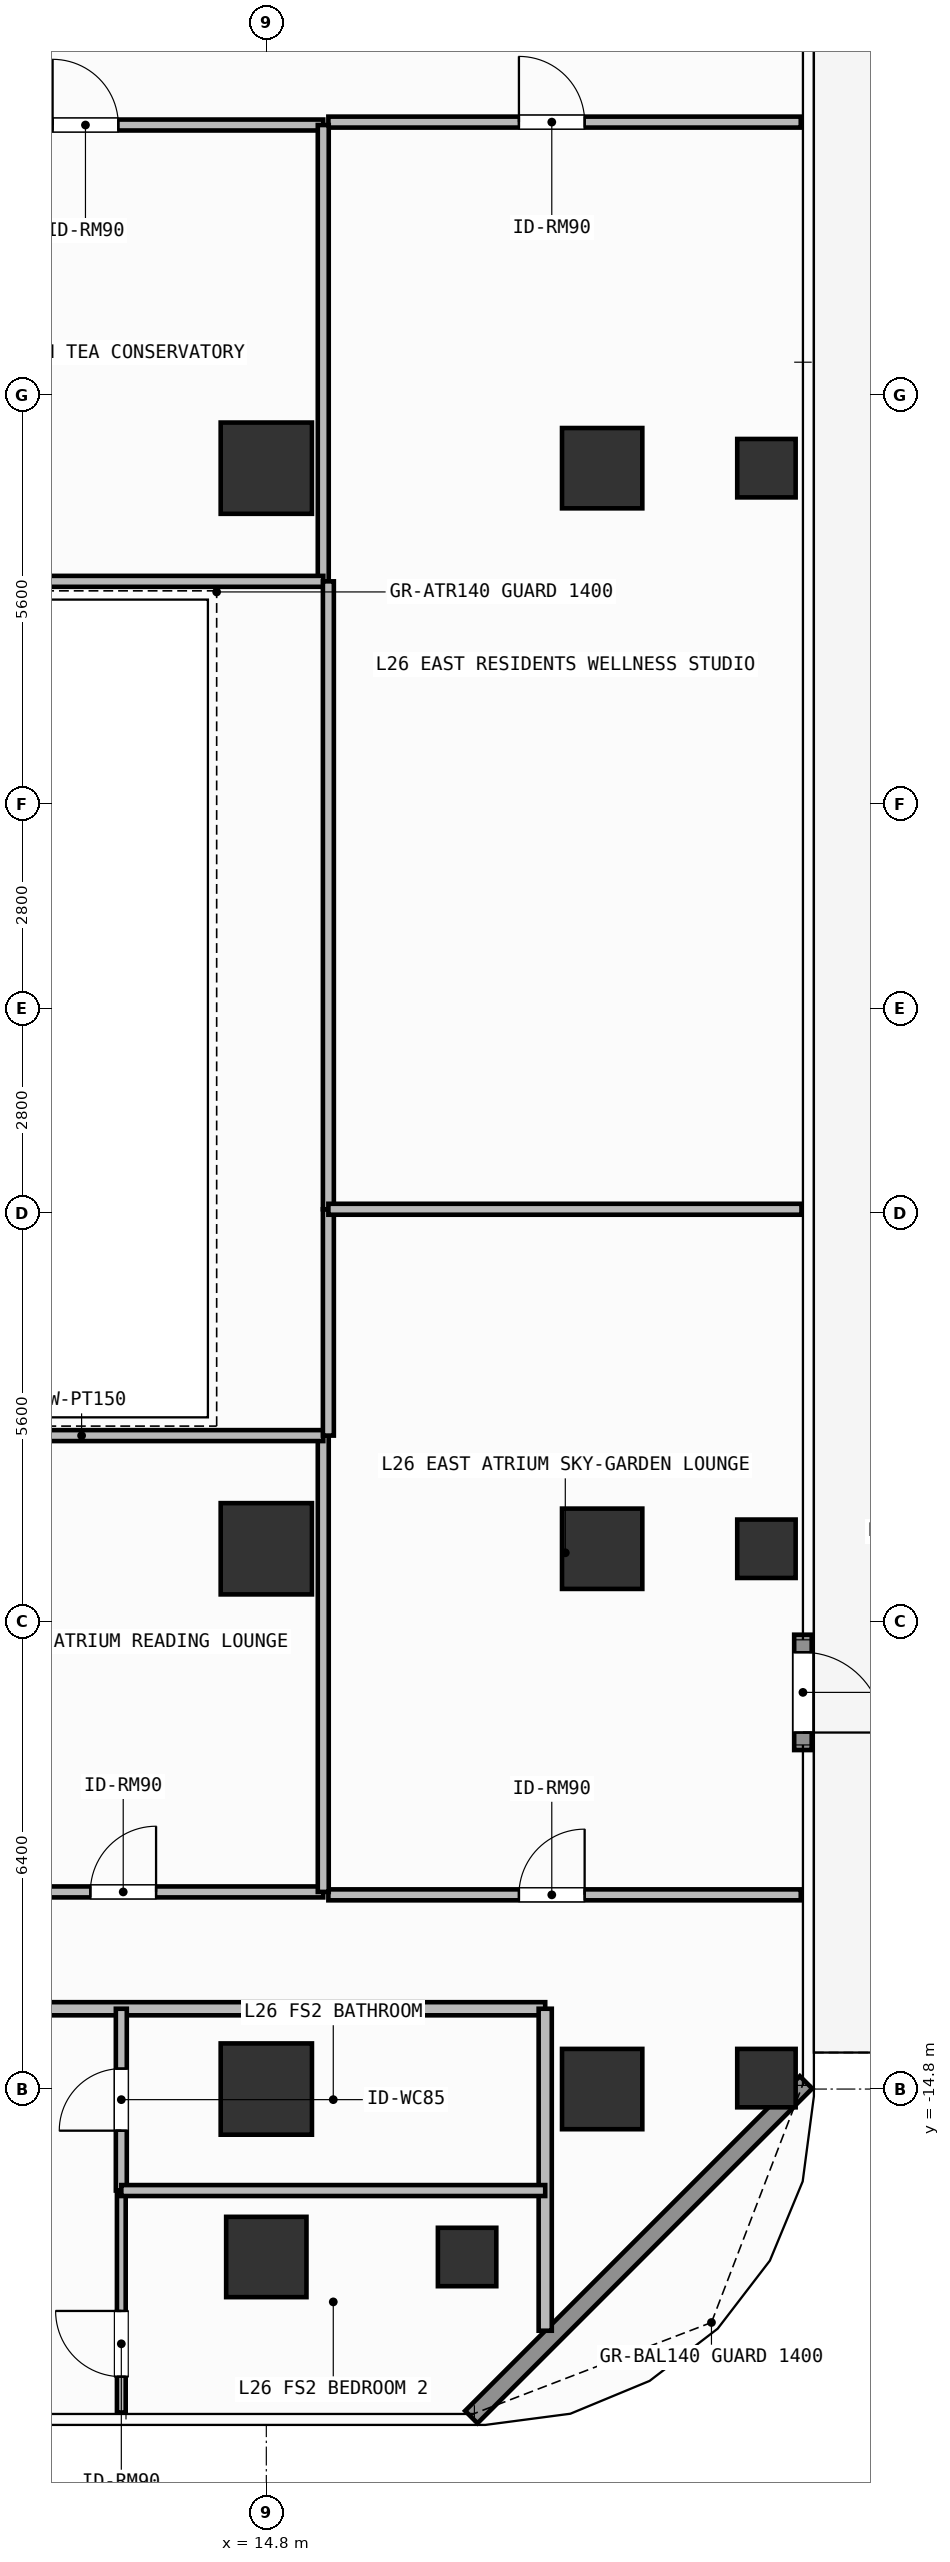
"""IFC4 building model, lengths in metres.
Left out: names, types, materials, properties, quantities, classifications, styles, units other than length and angle.
Written with IfcOpenShell. Run it as: python <this file> out.ifc"""

import sys

from ifc_helpers import new_model, si_unit, direction, frame, frame_2d, origin, origin_2d, place, context, subcontext, project, spatial, rectangle, hollow_rectangle, extrude, element, fill, save


model = new_model("IFC4")
c1 = context("Model", 3, precision=1e-05, world=origin(), true_north=direction((0.0, 1.0)))
c2 = subcontext(c1, "Body", "Model", "MODEL_VIEW")
j1 = project(units=[si_unit("LENGTHUNIT", "METRE"), si_unit("PLANEANGLEUNIT", "RADIAN")], contexts=[c1])
p1 = place(None, origin())
s1 = spatial("IfcSite", under=j1, at=p1, CompositionType="ELEMENT")
p2 = place(p1, origin())
s2 = spatial("IfcBuilding", under=s1, at=p2, CompositionType="ELEMENT")
p3 = place(p2, frame((0.0, 0.0, 104.7)))
s3 = spatial("IfcBuildingStorey", under=s2, at=p3, CompositionType="ELEMENT", Elevation=104.7)
for number, where, z_axis, x_axis in (
    (1, (14.8, -14.8, 0.0), (0.0, 0.0, 1.0), (1.0, 0.0, 0.0)),
    (2, (14.8, -7.4, 0.0), (0.0, 0.0, 1.0), (1.0, 0.0, 0.0)),
    (3, (14.8, 7.4, 0.0), (0.0, 0.0, 1.0), (1.0, 0.0, 0.0)),
):
    element("IfcColumn", number, at=place(p3, frame(where, z_axis=z_axis, x_axis=x_axis)), inside=s3, PredefinedType="COLUMN", context=c2, shape_type="SweptSolid", body=[
        extrude(rectangle(XDim=1.25, YDim=1.25, at=origin_2d()), origin(), (0.0, 0.0, 1.0), 3.9),
    ])
for number, where, z_axis, x_axis in (
    (4, (19.4, -14.8, 0.0), (0.0, 0.0, 1.0), (1.0, 0.0, 0.0)),
    (5, (19.4, -7.4, 0.0), (0.0, 0.0, 1.0), (1.0, 0.0, 0.0)),
    (6, (19.4, 7.4, 0.0), (0.0, 0.0, 1.0), (1.0, 0.0, 0.0)),
    (7, (14.8, -17.1, 0.0), (0.0, 0.0, 1.0), (1.0, 0.0, 0.0)),
):
    element("IfcColumn", number, at=place(p3, frame(where, z_axis=z_axis, x_axis=x_axis)), inside=s3, PredefinedType="COLUMN", context=c2, shape_type="SweptSolid", body=[
        extrude(rectangle(XDim=1.1, YDim=1.1, at=origin_2d()), origin(), (0.0, 0.0, 1.0), 3.9),
    ])
for number, where, z_axis, x_axis in (
    (8, (17.55, -17.1, 0.0), (0.0, 0.0, 1.0), (1.0, 0.0, 0.0)),
    (9, (21.65, -14.65, 0.0), (0.0, 0.0, 1.0), (1.0, 0.0, 0.0)),
    (10, (21.65, -7.4, 0.0), (0.0, 0.0, 1.0), (1.0, 0.0, 0.0)),
    (11, (21.65, 7.4, 0.0), (0.0, 0.0, 1.0), (1.0, 0.0, 0.0)),
):
    element("IfcColumn", number, at=place(p3, frame(where, z_axis=z_axis, x_axis=x_axis)), inside=s3, PredefinedType="COLUMN", context=c2, shape_type="SweptSolid", body=[
        extrude(hollow_rectangle(XDim=0.8, YDim=0.8, WallThickness=0.036, at=origin_2d()), origin(), (0.0, 0.0, 1.0), 3.9),
    ])
p4 = place(p3, frame((22.15, -8.577, 0.0), z_axis=(0.0, 0.0, 1.0), x_axis=(0.0, -1.0, 0.0)))
e12 = element("IfcWall", 12, at=p4, inside=s3, PredefinedType="SOLIDWALL", context=c2, shape_type="SweptSolid", body=[
    extrude(rectangle(XDim=1.58, YDim=0.24, at=frame_2d((0.79, 0.0))), origin(), (0.0, 0.0, 1.0), 3.62),
])
p5 = place(p4, frame((0.24, 0.0, 0.0)))
e13 = element("IfcOpeningElement", 13, at=p5, cuts=e12, PredefinedType="OPENING", context=c2, shape_type="SweptSolid", body=[
    extrude(rectangle(XDim=1.1, YDim=2.2, at=frame_2d((0.55, 1.1))), frame((0.0, 0.13, 0.0), z_axis=(0.0, -1.0, 0.0), x_axis=(1.0, 0.0, 0.0)), (0.0, 0.0, 1.0), 0.26),
])
p6 = place(p3, frame((22.192, -14.708, 0.0), z_axis=(0.0, 0.0, 1.0), x_axis=(-0.707087954376, -0.707125607496, 0.0)))
e14 = element("IfcWall", 14, at=p6, inside=s3, PredefinedType="SOLIDWALL", context=c2, shape_type="SweptSolid", body=[
    extrude(rectangle(XDim=6.484, YDim=0.24, at=frame_2d((3.242, 0.0))), origin(), (0.0, 0.0, 1.0), 3.62),
])
p7 = place(p3, frame((10.1, -12.1, 0.0), z_axis=(0.0, 0.0, 1.0), x_axis=(1.0, 0.0, 0.0)))
e15 = element("IfcWall", 15, at=p7, inside=s3, PredefinedType="PARTITIONING", context=c2, shape_type="SweptSolid", body=[
    extrude(rectangle(XDim=5.48, YDim=0.15, at=frame_2d((2.74, 0.0))), origin(), (0.0, 0.0, 1.0), 3.62),
])
p8 = place(p7, frame((2.29, 0.0, 0.0)))
e16 = element("IfcOpeningElement", 16, at=p8, cuts=e15, PredefinedType="OPENING", context=c2, shape_type="SweptSolid", body=[
    extrude(rectangle(XDim=0.9, YDim=2.1, at=frame_2d((0.45, 1.05))), frame((0.0, 0.085, 0.0), z_axis=(0.0, -1.0, 0.0), x_axis=(1.0, 0.0, 0.0)), (0.0, 0.0, 1.0), 0.17),
])
p9 = place(p3, frame((8.36, 12.1, 0.0), z_axis=(0.0, 0.0, 1.0), x_axis=(1.0, 0.0, 0.0)))
e17 = element("IfcWall", 17, at=p9, inside=s3, PredefinedType="PARTITIONING", context=c2, shape_type="SweptSolid", body=[
    extrude(rectangle(XDim=7.22, YDim=0.15, at=frame_2d((3.61, 0.0))), origin(), (0.0, 0.0, 1.0), 3.62),
])
p10 = place(p9, frame((3.513, 0.0, 0.0)))
e18 = element("IfcOpeningElement", 18, at=p10, cuts=e17, PredefinedType="OPENING", context=c2, shape_type="SweptSolid", body=[
    extrude(rectangle(XDim=0.9, YDim=2.1, at=frame_2d((0.45, 1.05))), frame((0.0, 0.085, 0.0), z_axis=(0.0, -1.0, 0.0), x_axis=(1.0, 0.0, 0.0)), (0.0, 0.0, 1.0), 0.17),
])
p11 = place(p3, frame((0.974, -13.7, 0.0), z_axis=(0.0, 0.0, 1.0), x_axis=(1.0, 0.0, 0.0)))
e19 = element("IfcWall", 19, at=p11, inside=s3, PredefinedType="PARTITIONING", context=c2, shape_type="SweptSolid", body=[
    extrude(rectangle(XDim=17.646, YDim=0.18, at=frame_2d((8.823, 0.0))), origin(), (0.0, 0.0, 1.0), 3.62),
])
p12 = place(p11, frame((7.695, 0.0, 0.0)))
e20 = element("IfcOpeningElement", 20, at=p12, cuts=e19, PredefinedType="OPENING", context=c2, shape_type="SweptSolid", body=[
    extrude(rectangle(XDim=1.0, YDim=2.2, at=frame_2d((0.5, 1.1))), frame((0.0, 0.1, 0.0), z_axis=(0.0, -1.0, 0.0), x_axis=(1.0, 0.0, 0.0)), (0.0, 0.0, 1.0), 0.2),
])
p13 = place(p3, frame((12.814, -16.19, 0.0), z_axis=(0.0, 0.0, 1.0), x_axis=(0.0, 1.0, 0.0)))
e21 = element("IfcWall", 21, at=p13, inside=s3, PredefinedType="PARTITIONING", context=c2, shape_type="SweptSolid", body=[
    extrude(rectangle(XDim=2.49, YDim=0.15, at=frame_2d((1.245, 0.0))), origin(), (0.0, 0.0, 1.0), 3.62),
])
p14 = place(p13, frame((0.82, 0.0, 0.0)))
e22 = element("IfcOpeningElement", 22, at=p14, cuts=e21, PredefinedType="OPENING", context=c2, shape_type="SweptSolid", body=[
    extrude(rectangle(XDim=0.85, YDim=2.1, at=frame_2d((0.425, 1.05))), frame((0.0, 0.085, 0.0), z_axis=(0.0, -1.0, 0.0), x_axis=(1.0, 0.0, 0.0)), (0.0, 0.0, 1.0), 0.17),
])
p15 = place(p3, frame((12.814, -19.23, 0.0), z_axis=(0.0, 0.0, 1.0), x_axis=(0.0, 1.0, 0.0)))
e23 = element("IfcWall", 23, at=p15, inside=s3, PredefinedType="PARTITIONING", context=c2, shape_type="SweptSolid", body=[
    extrude(rectangle(XDim=3.04, YDim=0.12, at=frame_2d((1.52, 0.0))), origin(), (0.0, 0.0, 1.0), 3.62),
])
p16 = place(p15, frame((0.491, 0.0, 0.0)))
e24 = element("IfcOpeningElement", 24, at=p16, cuts=e23, PredefinedType="OPENING", context=c2, shape_type="SweptSolid", body=[
    extrude(rectangle(XDim=0.9, YDim=2.1, at=frame_2d((0.45, 1.05))), frame((0.0, 0.07, 0.0), z_axis=(0.0, -1.0, 0.0), x_axis=(1.0, 0.0, 0.0)), (0.0, 0.0, 1.0), 0.14),
])
p17 = place(p3, frame((15.65, -12.14, 0.0), z_axis=(0.0, 0.0, 1.0), x_axis=(1.0, 0.0, 0.0)))
e25 = element("IfcWall", 25, at=p17, inside=s3, PredefinedType="PARTITIONING", context=c2, shape_type="SweptSolid", body=[
    extrude(rectangle(XDim=6.47, YDim=0.15, at=frame_2d((3.235, 0.0))), origin(), (0.0, 0.0, 1.0), 3.62),
])
p18 = place(p17, frame((2.61, 0.0, 0.0)))
e26 = element("IfcOpeningElement", 26, at=p18, cuts=e25, PredefinedType="OPENING", context=c2, shape_type="SweptSolid", body=[
    extrude(rectangle(XDim=0.9, YDim=2.1, at=frame_2d((0.45, 1.05))), frame((0.0, 0.085, 0.0), z_axis=(0.0, -1.0, 0.0), x_axis=(1.0, 0.0, 0.0)), (0.0, 0.0, 1.0), 0.17),
])
p19 = place(p3, frame((15.65, 12.14, 0.0), z_axis=(0.0, 0.0, 1.0), x_axis=(1.0, 0.0, 0.0)))
e27 = element("IfcWall", 27, at=p19, inside=s3, PredefinedType="PARTITIONING", context=c2, shape_type="SweptSolid", body=[
    extrude(rectangle(XDim=6.47, YDim=0.15, at=frame_2d((3.235, 0.0))), origin(), (0.0, 0.0, 1.0), 3.62),
])
p20 = place(p19, frame((2.61, 0.0, 0.0)))
e28 = element("IfcOpeningElement", 28, at=p20, cuts=e27, PredefinedType="OPENING", context=c2, shape_type="SweptSolid", body=[
    extrude(rectangle(XDim=0.9, YDim=2.1, at=frame_2d((0.45, 1.05))), frame((0.0, 0.085, 0.0), z_axis=(0.0, -1.0, 0.0), x_axis=(1.0, 0.0, 0.0)), (0.0, 0.0, 1.0), 0.17),
])
p21 = place(p3, frame((15.58, -12.1, 0.0), z_axis=(0.0, 0.0, 1.0), x_axis=(0.0, 1.0, 0.0)))
e29 = element("IfcWall", 29, at=p21, inside=s3, PredefinedType="PARTITIONING", context=c2, shape_type="SweptSolid", body=[
    extrude(rectangle(XDim=6.25, YDim=0.15, at=frame_2d((3.125, 0.0))), origin(), (0.0, 0.0, 1.0), 3.62),
])
p22 = place(p3, frame((8.96, -5.85, 0.0), z_axis=(0.0, 0.0, 1.0), x_axis=(1.0, 0.0, 0.0)))
e30 = element("IfcWall", 30, at=p22, inside=s3, PredefinedType="PARTITIONING", context=c2, shape_type="SweptSolid", body=[
    extrude(rectangle(XDim=6.62, YDim=0.15, at=frame_2d((3.31, 0.0))), origin(), (0.0, 0.0, 1.0), 3.62),
])
p23 = place(p3, frame((15.58, 5.85, 0.0), z_axis=(0.0, 0.0, 1.0), x_axis=(0.0, 1.0, 0.0)))
e31 = element("IfcWall", 31, at=p23, inside=s3, PredefinedType="PARTITIONING", context=c2, shape_type="SweptSolid", body=[
    extrude(rectangle(XDim=6.25, YDim=0.15, at=frame_2d((3.125, 0.0))), origin(), (0.0, 0.0, 1.0), 3.62),
])
p24 = place(p3, frame((8.96, 5.85, 0.0), z_axis=(0.0, 0.0, 1.0), x_axis=(1.0, 0.0, 0.0)))
e32 = element("IfcWall", 32, at=p24, inside=s3, PredefinedType="PARTITIONING", context=c2, shape_type="SweptSolid", body=[
    extrude(rectangle(XDim=6.62, YDim=0.15, at=frame_2d((3.31, 0.0))), origin(), (0.0, 0.0, 1.0), 3.62),
])
p25 = place(p3, frame((18.62, -18.11, 0.0), z_axis=(0.0, 0.0, 1.0), x_axis=(0.0, 1.0, 0.0)))
e33 = element("IfcWall", 33, at=p25, inside=s3, PredefinedType="PARTITIONING", context=c2, shape_type="SweptSolid", body=[
    extrude(rectangle(XDim=4.41, YDim=0.18, at=frame_2d((2.205, 0.0))), origin(), (0.0, 0.0, 1.0), 3.62),
])
p26 = place(p3, frame((12.814, -16.19, 0.0), z_axis=(0.0, 0.0, 1.0), x_axis=(1.0, 0.0, 0.0)))
e34 = element("IfcWall", 34, at=p26, inside=s3, PredefinedType="PARTITIONING", context=c2, shape_type="SweptSolid", body=[
    extrude(rectangle(XDim=5.806, YDim=0.15, at=frame_2d((2.903, 0.0))), origin(), (0.0, 0.0, 1.0), 3.62),
])
p27 = place(p3, frame((15.65, -5.85, 0.0), z_axis=(0.0, 0.0, 1.0), x_axis=(0.0, 1.0, 0.0)))
e35 = element("IfcWall", 35, at=p27, inside=s3, PredefinedType="PARTITIONING", context=c2, shape_type="SweptSolid", body=[
    extrude(rectangle(XDim=3.1, YDim=0.15, at=frame_2d((1.55, 0.0))), origin(), (0.0, 0.0, 1.0), 3.62),
])
p28 = place(p3, frame((15.65, -2.75, 0.0), z_axis=(0.0, 0.0, 1.0), x_axis=(0.0, 1.0, 0.0)))
e36 = element("IfcWall", 36, at=p28, inside=s3, PredefinedType="PARTITIONING", context=c2, shape_type="SweptSolid", body=[
    extrude(rectangle(XDim=8.6, YDim=0.15, at=frame_2d((4.3, 0.0))), origin(), (0.0, 0.0, 1.0), 3.62),
])
p29 = place(p3, frame((15.65, -2.75, 0.0), z_axis=(0.0, 0.0, 1.0), x_axis=(1.0, 0.0, 0.0)))
e37 = element("IfcWall", 37, at=p29, inside=s3, PredefinedType="PARTITIONING", context=c2, shape_type="SweptSolid", body=[
    extrude(rectangle(XDim=6.48, YDim=0.15, at=frame_2d((3.24, 0.0))), origin(), (0.0, 0.0, 1.0), 3.62),
])
p30 = place(p5, origin())
e38 = element("IfcDoor", 38, at=p30, inside=s3, OperationType="SINGLE_SWING_RIGHT", PredefinedType="DOOR", context=c2, shape_type="SweptSolid", body=[
    extrude(rectangle(XDim=1.1, YDim=2.2, at=frame_2d((0.55, 1.1))), frame((0.0, 0.025, 0.0), z_axis=(0.0, -1.0, 0.0), x_axis=(1.0, 0.0, 0.0)), (0.0, 0.0, 1.0), 0.05),
])
fill(e13, e38)
p31 = place(p8, origin())
e39 = element("IfcDoor", 39, at=p31, inside=s3, OperationType="SINGLE_SWING_RIGHT", PredefinedType="DOOR", context=c2, shape_type="SweptSolid", body=[
    extrude(rectangle(XDim=0.9, YDim=2.1, at=frame_2d((0.45, 1.05))), frame((0.0, 0.025, 0.0), z_axis=(0.0, -1.0, 0.0), x_axis=(1.0, 0.0, 0.0)), (0.0, 0.0, 1.0), 0.05),
])
fill(e16, e39)
p32 = place(p10, origin())
e40 = element("IfcDoor", 40, at=p32, inside=s3, OperationType="SINGLE_SWING_LEFT", PredefinedType="DOOR", context=c2, shape_type="SweptSolid", body=[
    extrude(rectangle(XDim=0.9, YDim=2.1, at=frame_2d((0.45, 1.05))), frame((0.0, 0.025, 0.0), z_axis=(0.0, -1.0, 0.0), x_axis=(1.0, 0.0, 0.0)), (0.0, 0.0, 1.0), 0.05),
])
fill(e18, e40)
p33 = place(p14, origin())
e41 = element("IfcDoor", 41, at=p33, inside=s3, OperationType="SINGLE_SWING_LEFT", PredefinedType="DOOR", context=c2, shape_type="SweptSolid", body=[
    extrude(rectangle(XDim=0.85, YDim=2.1, at=frame_2d((0.425, 1.05))), frame((0.0, 0.025, 0.0), z_axis=(0.0, -1.0, 0.0), x_axis=(1.0, 0.0, 0.0)), (0.0, 0.0, 1.0), 0.05),
])
fill(e22, e41)
p34 = place(p16, origin())
e42 = element("IfcDoor", 42, at=p34, inside=s3, OperationType="SINGLE_SWING_RIGHT", PredefinedType="DOOR", context=c2, shape_type="SweptSolid", body=[
    extrude(rectangle(XDim=0.9, YDim=2.1, at=frame_2d((0.45, 1.05))), frame((0.0, 0.025, 0.0), z_axis=(0.0, -1.0, 0.0), x_axis=(1.0, 0.0, 0.0)), (0.0, 0.0, 1.0), 0.05),
])
fill(e24, e42)
p35 = place(p18, origin())
e43 = element("IfcDoor", 43, at=p35, inside=s3, OperationType="SINGLE_SWING_RIGHT", PredefinedType="DOOR", context=c2, shape_type="SweptSolid", body=[
    extrude(rectangle(XDim=0.9, YDim=2.1, at=frame_2d((0.45, 1.05))), frame((0.0, 0.025, 0.0), z_axis=(0.0, -1.0, 0.0), x_axis=(1.0, 0.0, 0.0)), (0.0, 0.0, 1.0), 0.05),
])
fill(e26, e43)
p36 = place(p20, origin())
e44 = element("IfcDoor", 44, at=p36, inside=s3, OperationType="SINGLE_SWING_LEFT", PredefinedType="DOOR", context=c2, shape_type="SweptSolid", body=[
    extrude(rectangle(XDim=0.9, YDim=2.1, at=frame_2d((0.45, 1.05))), frame((0.0, 0.025, 0.0), z_axis=(0.0, -1.0, 0.0), x_axis=(1.0, 0.0, 0.0)), (0.0, 0.0, 1.0), 0.05),
])
fill(e28, e44)
save(model, sys.argv[1])
